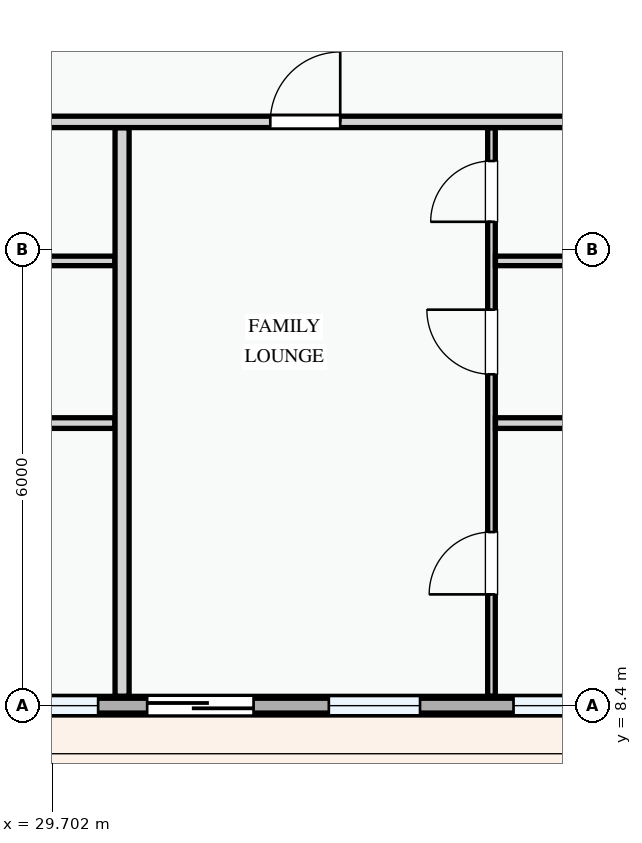
"""IFC4 building model, lengths in metres.
Left out: names, types, materials, properties, quantities, classifications, styles, units other than length and angle.
Written with IfcOpenShell. Run it as: python <this file> out.ifc"""

import sys

from ifc_helpers import new_model, si_unit, direction, frame, frame_2d, origin, place, context, subcontext, project, spatial, polyline, rectangle, outline, extrude, element, fill, save


model = new_model("IFC4")
c1 = context("Model", 3, precision=1e-05, world=origin(), true_north=direction((0.0, 1.0)))
c2 = subcontext(c1, "Body", "Model", "MODEL_VIEW")
j1 = project(units=[si_unit("LENGTHUNIT", "METRE"), si_unit("PLANEANGLEUNIT", "RADIAN")], contexts=[c1])
p1 = place(None, origin())
s1 = spatial("IfcSite", under=j1, at=p1, CompositionType="ELEMENT")
p2 = place(p1, origin())
s2 = spatial("IfcBuilding", under=s1, at=p2, CompositionType="ELEMENT")
p3 = place(p2, frame((0.0, 0.0, 34.5)))
s3 = spatial("IfcBuildingStorey", under=s2, at=p3, CompositionType="ELEMENT", Elevation=34.5)
p4 = place(p3, frame((28.8, 8.4, 0.0), z_axis=(0.0, 0.0, 1.0), x_axis=(1.0, 0.0, 0.0)))
e1 = element("IfcWall", 1, at=p4, inside=s3, PredefinedType="STANDARD", context=c2, shape_type="SweptSolid", body=[
    extrude(rectangle(XDim=8.4, YDim=0.245, at=frame_2d((4.2, 0.0))), origin(), (0.0, 0.0, 1.0), 2.375),
])
p5 = place(p4, frame((2.15, 0.0, 0.0)))
e2 = element("IfcOpeningElement", 2, at=p5, cuts=e1, PredefinedType="OPENING", context=c2, shape_type="SweptSolid", body=[
    extrude(rectangle(XDim=1.4, YDim=2.2, at=frame_2d((0.7, 1.1))), frame((0.0, 0.133, 0.0), z_axis=(0.0, -1.0, 0.0), x_axis=(1.0, 0.0, 0.0)), (0.0, 0.0, 1.0), 0.265),
])
p6 = place(p4, frame((0.505, 0.0, 0.78)))
e3 = element("IfcOpeningElement", 3, at=p6, cuts=e1, PredefinedType="OPENING", context=c2, shape_type="SweptSolid", body=[
    extrude(rectangle(XDim=1.0, YDim=1.25, at=frame_2d((0.5, 0.625))), frame((0.0, 0.133, 0.0), z_axis=(0.0, -1.0, 0.0), x_axis=(1.0, 0.0, 0.0)), (0.0, 0.0, 1.0), 0.265),
])
p7 = place(p4, frame((4.54, 0.0, 0.78)))
e4 = element("IfcOpeningElement", 4, at=p7, cuts=e1, PredefinedType="OPENING", context=c2, shape_type="SweptSolid", body=[
    extrude(rectangle(XDim=1.2, YDim=1.35, at=frame_2d((0.6, 0.675))), frame((0.0, 0.133, 0.0), z_axis=(0.0, -1.0, 0.0), x_axis=(1.0, 0.0, 0.0)), (0.0, 0.0, 1.0), 0.265),
])
p8 = place(p4, frame((6.97, 0.0, 0.78)))
e5 = element("IfcOpeningElement", 5, at=p8, cuts=e1, PredefinedType="OPENING", context=c2, shape_type="SweptSolid", body=[
    extrude(rectangle(XDim=0.95, YDim=1.15, at=frame_2d((0.475, 0.575))), frame((0.0, 0.133, 0.0), z_axis=(0.0, -1.0, 0.0), x_axis=(1.0, 0.0, 0.0)), (0.0, 0.0, 1.0), 0.265),
])
p9 = place(p3, frame((28.8, 8.4, 3.3), z_axis=(0.0, 0.0, 1.0), x_axis=(1.0, 0.0, 0.0)))
e6 = element("IfcWall", 6, at=p9, inside=s3, PredefinedType="PARAPET", context=c2, shape_type="SweptSolid", body=[
    extrude(outline(polyline([(0.0, 0.0), (8.4, 0.0), (8.4, 1.12), (7.7, 1.322), (7.0, 1.484), (6.3, 1.618), (5.6, 1.717), (4.9, 1.779), (4.2, 1.8), (3.5, 1.779), (2.8, 1.717), (2.1, 1.618), (1.4, 1.484), (0.7, 1.322), (0.0, 1.12), (0.0, 0.0)])), frame((0.0, 0.098, 0.0), z_axis=(0.0, -1.0, 0.0), x_axis=(1.0, 0.0, 0.0)), (0.0, 0.0, 1.0), 0.195),
])
p10 = place(p3, frame((26.692, 12.118, 0.0), z_axis=(0.0, 0.0, 1.0), x_axis=(1.0, 0.0, 0.0)))
e7 = element("IfcWall", 7, at=p10, inside=s3, PredefinedType="PARTITIONING", context=c2, shape_type="SweptSolid", body=[
    extrude(rectangle(XDim=3.833, YDim=0.14, at=frame_2d((1.917, 0.0))), origin(), (0.0, 0.0, 1.0), 3.0),
])
p11 = place(p3, frame((26.692, 14.251, 0.0), z_axis=(0.0, 0.0, 1.0), x_axis=(1.0, 0.0, 0.0)))
e8 = element("IfcWall", 8, at=p11, inside=s3, PredefinedType="PARTITIONING", context=c2, shape_type="SweptSolid", body=[
    extrude(rectangle(XDim=3.833, YDim=0.125, at=frame_2d((1.917, 0.0))), origin(), (0.0, 0.0, 1.0), 2.375),
])
p12 = place(p3, frame((35.48, 8.524, 0.0), z_axis=(0.0, 0.0, 1.0), x_axis=(0.0, 1.0, 0.0)))
e9 = element("IfcWall", 9, at=p12, inside=s3, PredefinedType="PARTITIONING", context=c2, shape_type="SweptSolid", body=[
    extrude(rectangle(XDim=7.479, YDim=0.1, at=frame_2d((3.739, 0.0))), origin(), (0.0, 0.0, 1.0), 3.0),
])
p13 = place(p12, frame((1.339, 0.0, 0.0)))
e10 = element("IfcOpeningElement", 10, at=p13, cuts=e9, PredefinedType="OPENING", context=c2, shape_type="SweptSolid", body=[
    extrude(rectangle(XDim=0.82, YDim=2.08, at=frame_2d((0.41, 1.04))), frame((0.0, 0.06, 0.0), z_axis=(0.0, -1.0, 0.0), x_axis=(1.0, 0.0, 0.0)), (0.0, 0.0, 1.0), 0.12),
])
p14 = place(p12, frame((4.235, 0.0, 0.0)))
e11 = element("IfcOpeningElement", 11, at=p14, cuts=e9, PredefinedType="OPENING", context=c2, shape_type="SweptSolid", body=[
    extrude(rectangle(XDim=0.85, YDim=2.1, at=frame_2d((0.425, 1.05))), frame((0.0, 0.06, 0.0), z_axis=(0.0, -1.0, 0.0), x_axis=(1.0, 0.0, 0.0)), (0.0, 0.0, 1.0), 0.12),
])
p15 = place(p12, frame((6.241, 0.0, 0.0)))
e12 = element("IfcOpeningElement", 12, at=p15, cuts=e9, PredefinedType="OPENING", context=c2, shape_type="SweptSolid", body=[
    extrude(rectangle(XDim=0.8, YDim=2.1, at=frame_2d((0.4, 1.05))), frame((0.0, 0.06, 0.0), z_axis=(0.0, -1.0, 0.0), x_axis=(1.0, 0.0, 0.0)), (0.0, 0.0, 1.0), 0.12),
])
p16 = place(p3, frame((35.532, 12.118, 0.0), z_axis=(0.0, 0.0, 1.0), x_axis=(1.0, 0.0, 0.0)))
e13 = element("IfcWall", 13, at=p16, inside=s3, PredefinedType="PARTITIONING", context=c2, shape_type="SweptSolid", body=[
    extrude(rectangle(XDim=7.543, YDim=0.14, at=frame_2d((3.772, 0.0))), origin(), (0.0, 0.0, 1.0), 3.0),
])
p17 = place(p3, frame((35.532, 14.251, 0.0), z_axis=(0.0, 0.0, 1.0), x_axis=(1.0, 0.0, 0.0)))
e14 = element("IfcWall", 14, at=p17, inside=s3, PredefinedType="PARTITIONING", context=c2, shape_type="SweptSolid", body=[
    extrude(rectangle(XDim=7.543, YDim=0.125, at=frame_2d((3.772, 0.0))), origin(), (0.0, 0.0, 1.0), 2.375),
])
p18 = place(p3, frame((30.62, 8.524, 0.0), z_axis=(0.0, 0.0, 1.0), x_axis=(0.0, 1.0, 0.0)))
e15 = element("IfcWall", 15, at=p18, inside=s3, PredefinedType="PARTITIONING", context=c2, shape_type="SweptSolid", body=[
    extrude(rectangle(XDim=7.479, YDim=0.185, at=frame_2d((3.739, 0.0))), origin(), (0.0, 0.0, 1.0), 3.0),
])
p19 = place(p3, frame((22.66, 16.08, 0.0), z_axis=(0.0, 0.0, 1.0), x_axis=(1.0, 0.0, 0.0)))
e16 = element("IfcWall", 16, at=p19, inside=s3, PredefinedType="PARTITIONING", context=c2, shape_type="SweptSolid", body=[
    extrude(rectangle(XDim=20.416, YDim=0.15, at=frame_2d((10.208, 0.0))), origin(), (0.0, 0.0, 1.0), 3.0),
])
p20 = place(p19, frame((2.691, 0.0, 0.0)))
e17 = element("IfcOpeningElement", 17, at=p20, cuts=e16, PredefinedType="OPENING", context=c2, shape_type="SweptSolid", body=[
    extrude(rectangle(XDim=0.92, YDim=2.1, at=frame_2d((0.46, 1.05))), frame((0.0, 0.085, 0.0), z_axis=(0.0, -1.0, 0.0), x_axis=(1.0, 0.0, 0.0)), (0.0, 0.0, 1.0), 0.17),
])
p21 = place(p19, frame((9.91, 0.0, 0.0)))
e18 = element("IfcOpeningElement", 18, at=p21, cuts=e16, PredefinedType="OPENING", context=c2, shape_type="SweptSolid", body=[
    extrude(rectangle(XDim=0.92, YDim=2.1, at=frame_2d((0.46, 1.05))), frame((0.0, 0.085, 0.0), z_axis=(0.0, -1.0, 0.0), x_axis=(1.0, 0.0, 0.0)), (0.0, 0.0, 1.0), 0.17),
])
p22 = place(p5, frame((1.4, 0.0, 0.0), z_axis=(0.0, 0.0, 1.0), x_axis=(-1.0, 0.0, 0.0)))
e19 = element("IfcDoor", 19, at=p22, inside=s3, OperationType="SLIDING_TO_LEFT", PredefinedType="DOOR", context=c2, shape_type="SweptSolid", body=[
    extrude(rectangle(XDim=1.4, YDim=2.2, at=frame_2d((0.7, 1.1))), frame((0.0, 0.025, 0.0), z_axis=(0.0, -1.0, 0.0), x_axis=(1.0, 0.0, 0.0)), (0.0, 0.0, 1.0), 0.05),
])
fill(e2, e19)
p23 = place(p6, origin())
e20 = element("IfcWindow", 20, at=p23, inside=s3, PartitioningType="SINGLE_PANEL", PredefinedType="WINDOW", context=c2, shape_type="SweptSolid", body=[
    extrude(rectangle(XDim=1.0, YDim=1.25, at=frame_2d((0.5, 0.625))), frame((0.0, 0.03, 0.0), z_axis=(0.0, -1.0, 0.0), x_axis=(1.0, 0.0, 0.0)), (0.0, 0.0, 1.0), 0.06),
])
fill(e3, e20)
p24 = place(p7, origin())
e21 = element("IfcWindow", 21, at=p24, inside=s3, PartitioningType="SINGLE_PANEL", PredefinedType="WINDOW", context=c2, shape_type="SweptSolid", body=[
    extrude(rectangle(XDim=1.2, YDim=1.35, at=frame_2d((0.6, 0.675))), frame((0.0, 0.03, 0.0), z_axis=(0.0, -1.0, 0.0), x_axis=(1.0, 0.0, 0.0)), (0.0, 0.0, 1.0), 0.06),
])
fill(e4, e21)
p25 = place(p8, origin())
e22 = element("IfcWindow", 22, at=p25, inside=s3, PartitioningType="SINGLE_PANEL", PredefinedType="WINDOW", context=c2, shape_type="SweptSolid", body=[
    extrude(rectangle(XDim=0.95, YDim=1.15, at=frame_2d((0.475, 0.575))), frame((0.0, 0.03, 0.0), z_axis=(0.0, -1.0, 0.0), x_axis=(1.0, 0.0, 0.0)), (0.0, 0.0, 1.0), 0.06),
])
fill(e5, e22)
p26 = place(p13, origin())
e23 = element("IfcDoor", 23, at=p26, inside=s3, OperationType="SINGLE_SWING_LEFT", PredefinedType="DOOR", context=c2, shape_type="SweptSolid", body=[
    extrude(rectangle(XDim=0.82, YDim=2.08, at=frame_2d((0.41, 1.04))), frame((0.0, 0.025, 0.0), z_axis=(0.0, -1.0, 0.0), x_axis=(1.0, 0.0, 0.0)), (0.0, 0.0, 1.0), 0.05),
])
fill(e10, e23)
p27 = place(p14, origin())
e24 = element("IfcDoor", 24, at=p27, inside=s3, OperationType="SINGLE_SWING_RIGHT", PredefinedType="DOOR", context=c2, shape_type="SweptSolid", body=[
    extrude(rectangle(XDim=0.85, YDim=2.1, at=frame_2d((0.425, 1.05))), frame((0.0, 0.025, 0.0), z_axis=(0.0, -1.0, 0.0), x_axis=(1.0, 0.0, 0.0)), (0.0, 0.0, 1.0), 0.05),
])
fill(e11, e24)
p28 = place(p15, origin())
e25 = element("IfcDoor", 25, at=p28, inside=s3, OperationType="SINGLE_SWING_LEFT", PredefinedType="DOOR", context=c2, shape_type="SweptSolid", body=[
    extrude(rectangle(XDim=0.8, YDim=2.1, at=frame_2d((0.4, 1.05))), frame((0.0, 0.025, 0.0), z_axis=(0.0, -1.0, 0.0), x_axis=(1.0, 0.0, 0.0)), (0.0, 0.0, 1.0), 0.05),
])
fill(e12, e25)
p29 = place(p21, origin())
e26 = element("IfcDoor", 26, at=p29, inside=s3, OperationType="SINGLE_SWING_RIGHT", PredefinedType="DOOR", context=c2, shape_type="SweptSolid", body=[
    extrude(rectangle(XDim=0.92, YDim=2.1, at=frame_2d((0.46, 1.05))), frame((0.0, 0.025, 0.0), z_axis=(0.0, -1.0, 0.0), x_axis=(1.0, 0.0, 0.0)), (0.0, 0.0, 1.0), 0.05),
])
fill(e18, e26)
save(model, sys.argv[1])
